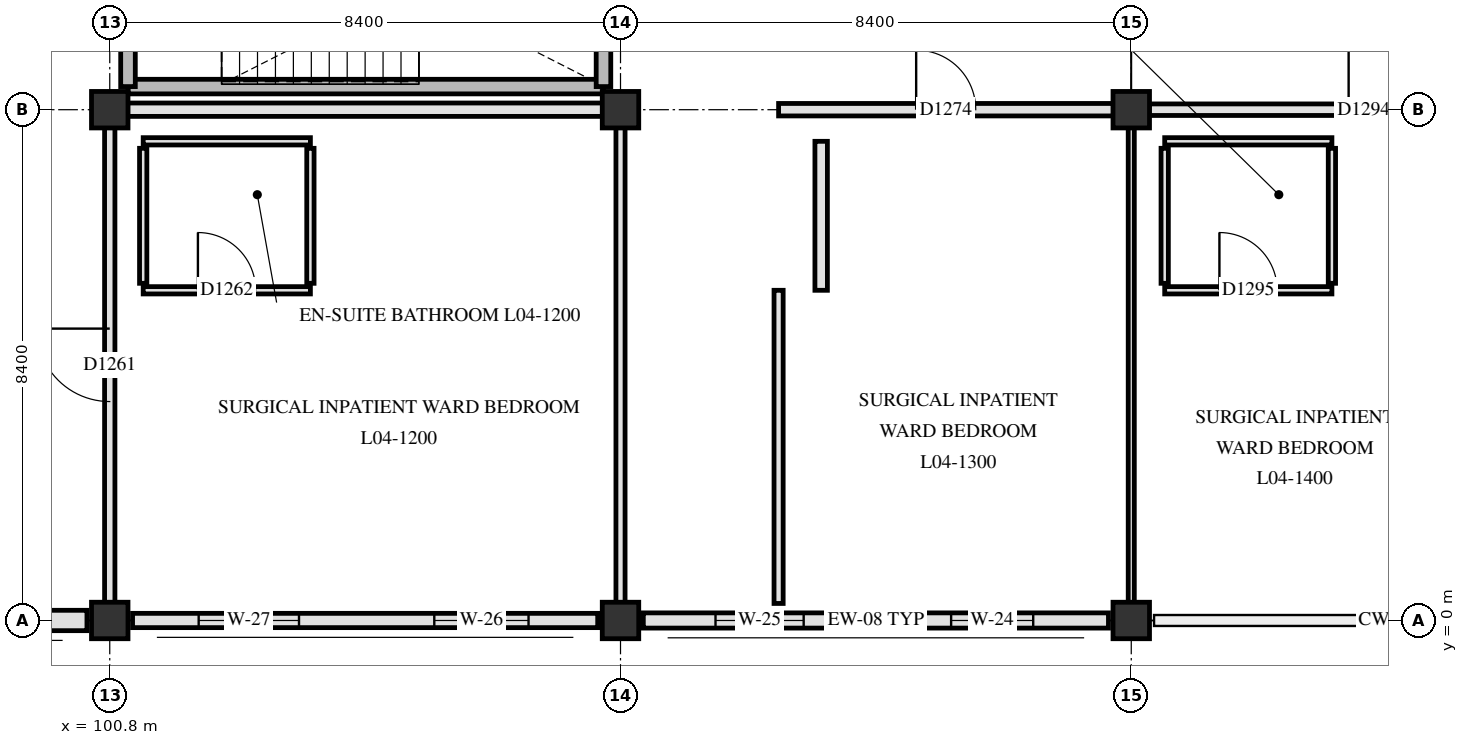
"""IFC4 building model, lengths in metres.
Left out: names, types, materials, properties, quantities, classifications, styles, units other than length and angle.
Written with IfcOpenShell. Run it as: python <this file> out.ifc"""

import sys

from ifc_helpers import new_model, si_unit, direction, frame, frame_2d, origin, origin_2d, place, context, subcontext, project, spatial, rectangle, extrude, element, fill, save


model = new_model("IFC4")
c1 = context("Model", 3, precision=1e-05, world=origin(), true_north=direction((0.0, 1.0)))
c2 = subcontext(c1, "Body", "Model", "MODEL_VIEW")
j1 = project(units=[si_unit("LENGTHUNIT", "METRE"), si_unit("PLANEANGLEUNIT", "RADIAN")], contexts=[c1])
p1 = place(None, origin())
s1 = spatial("IfcSite", under=j1, at=p1, CompositionType="ELEMENT")
p2 = place(p1, origin())
s2 = spatial("IfcBuilding", under=s1, at=p2, CompositionType="ELEMENT")
p3 = place(p2, frame((0.0, 0.0, 18.6)))
s3 = spatial("IfcBuildingStorey", under=s2, at=p3, CompositionType="ELEMENT", Elevation=18.6)
for number, where, z_axis, x_axis in (
    (1, (100.8, 0.0, 0.0), (0.0, 0.0, 1.0), (1.0, 0.0, 0.0)),
    (2, (100.8, 8.4, 0.0), (0.0, 0.0, 1.0), (1.0, 0.0, 0.0)),
    (3, (109.2, 0.0, 0.0), (0.0, 0.0, 1.0), (1.0, 0.0, 0.0)),
    (4, (109.2, 8.4, 0.0), (0.0, 0.0, 1.0), (1.0, 0.0, 0.0)),
    (5, (117.6, 0.0, 0.0), (0.0, 0.0, 1.0), (1.0, 0.0, 0.0)),
    (6, (117.6, 8.4, 0.0), (0.0, 0.0, 1.0), (1.0, 0.0, 0.0)),
):
    element("IfcColumn", number, at=place(p3, frame(where, z_axis=z_axis, x_axis=x_axis)), inside=s3, PredefinedType="COLUMN", context=c2, shape_type="SweptSolid", body=[
        extrude(rectangle(XDim=0.6, YDim=0.6, at=origin_2d()), origin(), (0.0, 0.0, 1.0), 3.9),
    ])
p4 = place(p3, frame((117.225, 0.0, 0.0), z_axis=(0.0, 0.0, 1.0), x_axis=(-1.0, 0.0, 0.0)))
e7 = element("IfcWall", 7, at=p4, inside=s3, PredefinedType="SOLIDWALL", context=c2, shape_type="SweptSolid", body=[
    extrude(rectangle(XDim=7.65, YDim=0.25, at=frame_2d((3.825, 0.0))), origin(), (0.0, 0.0, 1.0), 3.31),
])
p5 = place(p4, frame((1.238, 0.0, 0.85)))
e8 = element("IfcOpeningElement", 8, at=p5, cuts=e7, PredefinedType="OPENING", context=c2, shape_type="SweptSolid", body=[
    extrude(rectangle(XDim=1.35, YDim=1.54, at=frame_2d((0.675, 0.77))), frame((0.0, 0.135, 0.0), z_axis=(0.0, -1.0, 0.0), x_axis=(1.0, 0.0, 0.0)), (0.0, 0.0, 1.0), 0.27),
])
p6 = place(p4, frame((5.012, 0.0, 0.85)))
e9 = element("IfcOpeningElement", 9, at=p6, cuts=e7, PredefinedType="OPENING", context=c2, shape_type="SweptSolid", body=[
    extrude(rectangle(XDim=1.45, YDim=1.54, at=frame_2d((0.725, 0.77))), frame((0.0, 0.135, 0.0), z_axis=(0.0, -1.0, 0.0), x_axis=(1.0, 0.0, 0.0)), (0.0, 0.0, 1.0), 0.27),
])
p7 = place(p3, frame((108.825, 0.0, 0.0), z_axis=(0.0, 0.0, 1.0), x_axis=(-1.0, 0.0, 0.0)))
e10 = element("IfcWall", 10, at=p7, inside=s3, PredefinedType="SOLIDWALL", context=c2, shape_type="SweptSolid", body=[
    extrude(rectangle(XDim=7.65, YDim=0.235, at=frame_2d((3.825, 0.0))), origin(), (0.0, 0.0, 1.0), 3.31),
])
p8 = place(p7, frame((1.137, 0.0, 0.85)))
e11 = element("IfcOpeningElement", 11, at=p8, cuts=e10, PredefinedType="OPENING", context=c2, shape_type="SweptSolid", body=[
    extrude(rectangle(XDim=1.55, YDim=1.54, at=frame_2d((0.775, 0.77))), frame((0.0, 0.127, 0.0), z_axis=(0.0, -1.0, 0.0), x_axis=(1.0, 0.0, 0.0)), (0.0, 0.0, 1.0), 0.255),
])
p9 = place(p7, frame((4.913, 0.0, 0.85)))
e12 = element("IfcOpeningElement", 12, at=p9, cuts=e10, PredefinedType="OPENING", context=c2, shape_type="SweptSolid", body=[
    extrude(rectangle(XDim=1.65, YDim=1.54, at=frame_2d((0.825, 0.77))), frame((0.0, 0.127, 0.0), z_axis=(0.0, -1.0, 0.0), x_axis=(1.0, 0.0, 0.0)), (0.0, 0.0, 1.0), 0.255),
])
p10 = place(p3, frame((100.425, 0.0, 0.0), z_axis=(0.0, 0.0, 1.0), x_axis=(-1.0, 0.0, 0.0)))
e13 = element("IfcWall", 13, at=p10, inside=s3, PredefinedType="SOLIDWALL", context=c2, shape_type="SweptSolid", body=[
    extrude(rectangle(XDim=7.65, YDim=0.335, at=frame_2d((3.825, 0.0))), origin(), (0.0, 0.0, 1.0), 3.31),
])
p11 = place(p10, frame((1.038, 0.0, 0.85)))
e14 = element("IfcOpeningElement", 14, at=p11, cuts=e13, PredefinedType="OPENING", context=c2, shape_type="SweptSolid", body=[
    extrude(rectangle(XDim=1.75, YDim=1.54, at=frame_2d((0.875, 0.77))), frame((0.0, 0.177, 0.0), z_axis=(0.0, -1.0, 0.0), x_axis=(1.0, 0.0, 0.0)), (0.0, 0.0, 1.0), 0.355),
])
p12 = place(p10, frame((4.812, 0.0, 0.85)))
e15 = element("IfcOpeningElement", 15, at=p12, cuts=e13, PredefinedType="OPENING", context=c2, shape_type="SweptSolid", body=[
    extrude(rectangle(XDim=1.85, YDim=1.54, at=frame_2d((0.925, 0.77))), frame((0.0, 0.177, 0.0), z_axis=(0.0, -1.0, 0.0), x_axis=(1.0, 0.0, 0.0)), (0.0, 0.0, 1.0), 0.355),
])
p13 = place(p3, frame((101.1, 8.78, 0.0), z_axis=(0.0, 0.0, 1.0), x_axis=(1.0, 0.0, 0.0)))
e16 = element("IfcWall", 16, at=p13, inside=s3, PredefinedType="SHEAR", context=c2, shape_type="SweptSolid", body=[
    extrude(rectangle(XDim=7.82, YDim=0.24, at=frame_2d((3.91, 0.0))), origin(), (0.0, 0.0, 1.0), 3.62),
])
for number, where, z_axis, x_axis in (
    (17, (101.1, 8.78, 0.0), (0.0, 0.0, 1.0), (0.0, 1.0, 0.0)),
    (18, (108.92, 8.78, 0.0), (0.0, 0.0, 1.0), (0.0, 1.0, 0.0)),
):
    element("IfcWall", number, at=place(p3, frame(where, z_axis=z_axis, x_axis=x_axis)), inside=s3, PredefinedType="SHEAR", context=c2, shape_type="SweptSolid", body=[
        extrude(rectangle(XDim=3.32, YDim=0.24, at=frame_2d((1.66, 0.0))), origin(), (0.0, 0.0, 1.0), 3.62),
    ])
p14 = place(p3, frame((101.35, 5.43, 0.0), z_axis=(0.0, 0.0, 1.0), x_axis=(1.0, 0.0, 0.0)))
e19 = element("IfcWall", 19, at=p14, inside=s3, PredefinedType="PARTITIONING", context=c2, shape_type="SweptSolid", body=[
    extrude(rectangle(XDim=2.75, YDim=0.12, at=frame_2d((1.375, 0.0))), origin(), (0.0, 0.0, 1.0), 3.61),
])
p15 = place(p14, frame((0.9, 0.0, 0.0)))
e20 = element("IfcOpeningElement", 20, at=p15, cuts=e19, PredefinedType="OPENING", context=c2, shape_type="SweptSolid", body=[
    extrude(rectangle(XDim=0.95, YDim=2.1, at=frame_2d((0.475, 1.05))), frame((0.0, 0.07, 0.0), z_axis=(0.0, -1.0, 0.0), x_axis=(1.0, 0.0, 0.0)), (0.0, 0.0, 1.0), 0.14),
])
p16 = place(p3, frame((118.15, 5.43, 0.0), z_axis=(0.0, 0.0, 1.0), x_axis=(1.0, 0.0, 0.0)))
e21 = element("IfcWall", 21, at=p16, inside=s3, PredefinedType="PARTITIONING", context=c2, shape_type="SweptSolid", body=[
    extrude(rectangle(XDim=2.75, YDim=0.12, at=frame_2d((1.375, 0.0))), origin(), (0.0, 0.0, 1.0), 3.61),
])
p17 = place(p16, frame((0.9, 0.0, 0.0)))
e22 = element("IfcOpeningElement", 22, at=p17, cuts=e21, PredefinedType="OPENING", context=c2, shape_type="SweptSolid", body=[
    extrude(rectangle(XDim=0.95, YDim=2.1, at=frame_2d((0.475, 1.05))), frame((0.0, 0.07, 0.0), z_axis=(0.0, -1.0, 0.0), x_axis=(1.0, 0.0, 0.0)), (0.0, 0.0, 1.0), 0.14),
])
for number, where, z_axis, x_axis in (
    (23, (101.35, 7.88, 0.0), (0.0, 0.0, 1.0), (1.0, 0.0, 0.0)),
    (24, (118.15, 7.88, 0.0), (0.0, 0.0, 1.0), (1.0, 0.0, 0.0)),
):
    element("IfcWall", number, at=place(p3, frame(where, z_axis=z_axis, x_axis=x_axis)), inside=s3, PredefinedType="PARTITIONING", context=c2, shape_type="SweptSolid", body=[
        extrude(rectangle(XDim=2.75, YDim=0.12, at=frame_2d((1.375, 0.0))), origin(), (0.0, 0.0, 1.0), 3.61),
    ])
p18 = place(p3, frame((101.095, 8.4, 0.0), z_axis=(0.0, 0.0, 1.0), x_axis=(1.0, 0.0, 0.0)))
e25 = element("IfcWall", 25, at=p18, inside=s3, PredefinedType="PARTITIONING", context=c2, shape_type="SweptSolid", body=[
    extrude(rectangle(XDim=7.81, YDim=0.22, at=frame_2d((3.905, 0.0))), origin(), (0.0, 0.0, 1.0), 3.16),
])
p19 = place(p3, frame((111.8, 8.4, 0.0), z_axis=(0.0, 0.0, 1.0), x_axis=(1.0, 0.0, 0.0)))
e26 = element("IfcWall", 26, at=p19, inside=s3, PredefinedType="PARTITIONING", context=c2, shape_type="SweptSolid", body=[
    extrude(rectangle(XDim=5.505, YDim=0.205, at=frame_2d((2.752, 0.0))), origin(), (0.0, 0.0, 1.0), 3.16),
])
p20 = place(p19, frame((2.262, 0.0, 0.0)))
e27 = element("IfcOpeningElement", 27, at=p20, cuts=e26, PredefinedType="OPENING", context=c2, shape_type="SweptSolid", body=[
    extrude(rectangle(XDim=0.98, YDim=2.12, at=frame_2d((0.49, 1.06))), frame((0.0, 0.113, 0.0), z_axis=(0.0, -1.0, 0.0), x_axis=(1.0, 0.0, 0.0)), (0.0, 0.0, 1.0), 0.225),
])
p21 = place(p3, frame((117.895, 8.4, 0.0), z_axis=(0.0, 0.0, 1.0), x_axis=(1.0, 0.0, 0.0)))
e28 = element("IfcWall", 28, at=p21, inside=s3, PredefinedType="PARTITIONING", context=c2, shape_type="SweptSolid", body=[
    extrude(rectangle(XDim=7.81, YDim=0.19, at=frame_2d((3.905, 0.0))), origin(), (0.0, 0.0, 1.0), 3.16),
])
p22 = place(p21, frame((3.28, 0.0, 0.0)))
e29 = element("IfcOpeningElement", 29, at=p22, cuts=e28, PredefinedType="OPENING", context=c2, shape_type="SweptSolid", body=[
    extrude(rectangle(XDim=1.25, YDim=2.2, at=frame_2d((0.625, 1.1))), frame((0.0, 0.105, 0.0), z_axis=(0.0, -1.0, 0.0), x_axis=(1.0, 0.0, 0.0)), (0.0, 0.0, 1.0), 0.21),
])
p23 = place(p3, frame((100.8, 0.295, 0.0), z_axis=(0.0, 0.0, 1.0), x_axis=(0.0, 1.0, 0.0)))
e30 = element("IfcWall", 30, at=p23, inside=s3, PredefinedType="PARTITIONING", context=c2, shape_type="SweptSolid", body=[
    extrude(rectangle(XDim=7.81, YDim=0.17, at=frame_2d((3.905, 0.0))), origin(), (0.0, 0.0, 1.0), 3.26),
])
p24 = place(p23, frame((3.305, 0.0, 0.0)))
e31 = element("IfcOpeningElement", 31, at=p24, cuts=e30, PredefinedType="OPENING", context=c2, shape_type="SweptSolid", body=[
    extrude(rectangle(XDim=1.2, YDim=2.15, at=frame_2d((0.6, 1.075))), frame((0.0, 0.095, 0.0), z_axis=(0.0, -1.0, 0.0), x_axis=(1.0, 0.0, 0.0)), (0.0, 0.0, 1.0), 0.19),
])
for number, where, z_axis, x_axis in (
    (32, (101.35, 5.545, 0.0), (0.0, 0.0, 1.0), (0.0, 1.0, 0.0)),
    (33, (104.1, 5.545, 0.0), (0.0, 0.0, 1.0), (0.0, 1.0, 0.0)),
):
    element("IfcWall", number, at=place(p3, frame(where, z_axis=z_axis, x_axis=x_axis)), inside=s3, PredefinedType="PARTITIONING", context=c2, shape_type="SweptSolid", body=[
        extrude(rectangle(XDim=2.22, YDim=0.12, at=frame_2d((1.11, 0.0))), origin(), (0.0, 0.0, 1.0), 3.31),
    ])
p25 = place(p3, frame((109.2, 0.295, 0.0), z_axis=(0.0, 0.0, 1.0), x_axis=(0.0, 1.0, 0.0)))
e34 = element("IfcWall", 34, at=p25, inside=s3, PredefinedType="PARTITIONING", context=c2, shape_type="SweptSolid", body=[
    extrude(rectangle(XDim=7.81, YDim=0.15, at=frame_2d((3.905, 0.0))), origin(), (0.0, 0.0, 1.0), 3.26),
])
p26 = place(p3, frame((111.8, 0.28, 0.0), z_axis=(0.0, 0.0, 1.0), x_axis=(0.0, 1.0, 0.0)))
e35 = element("IfcWall", 35, at=p26, inside=s3, PredefinedType="PARTITIONING", context=c2, shape_type="SweptSolid", body=[
    extrude(rectangle(XDim=5.15, YDim=0.15, at=frame_2d((2.575, 0.0))), origin(), (0.0, 0.0, 1.0), 3.31),
])
p27 = place(p3, frame((112.5, 5.43, 0.0), z_axis=(0.0, 0.0, 1.0), x_axis=(0.0, 1.0, 0.0)))
e36 = element("IfcWall", 36, at=p27, inside=s3, PredefinedType="PARTITIONING", context=c2, shape_type="SweptSolid", body=[
    extrude(rectangle(XDim=2.45, YDim=0.205, at=frame_2d((1.225, 0.0))), origin(), (0.0, 0.0, 1.0), 3.31),
])
p28 = place(p3, frame((117.6, 0.295, 0.0), z_axis=(0.0, 0.0, 1.0), x_axis=(0.0, 1.0, 0.0)))
e37 = element("IfcWall", 37, at=p28, inside=s3, PredefinedType="PARTITIONING", context=c2, shape_type="SweptSolid", body=[
    extrude(rectangle(XDim=7.81, YDim=0.1, at=frame_2d((3.905, 0.0))), origin(), (0.0, 0.0, 1.0), 3.26),
])
for number, where, z_axis, x_axis in (
    (38, (118.15, 5.545, 0.0), (0.0, 0.0, 1.0), (0.0, 1.0, 0.0)),
    (39, (120.9, 5.545, 0.0), (0.0, 0.0, 1.0), (0.0, 1.0, 0.0)),
):
    element("IfcWall", number, at=place(p3, frame(where, z_axis=z_axis, x_axis=x_axis)), inside=s3, PredefinedType="PARTITIONING", context=c2, shape_type="SweptSolid", body=[
        extrude(rectangle(XDim=2.22, YDim=0.12, at=frame_2d((1.11, 0.0))), origin(), (0.0, 0.0, 1.0), 3.31),
    ])
p29 = place(p5, origin())
e40 = element("IfcWindow", 40, at=p29, inside=s3, PartitioningType="SINGLE_PANEL", PredefinedType="WINDOW", context=c2, shape_type="SweptSolid", body=[
    extrude(rectangle(XDim=1.35, YDim=1.54, at=frame_2d((0.675, 0.77))), frame((0.0, 0.03, 0.0), z_axis=(0.0, -1.0, 0.0), x_axis=(1.0, 0.0, 0.0)), (0.0, 0.0, 1.0), 0.06),
])
fill(e8, e40)
p30 = place(p6, origin())
e41 = element("IfcWindow", 41, at=p30, inside=s3, PartitioningType="SINGLE_PANEL", PredefinedType="WINDOW", context=c2, shape_type="SweptSolid", body=[
    extrude(rectangle(XDim=1.45, YDim=1.54, at=frame_2d((0.725, 0.77))), frame((0.0, 0.03, 0.0), z_axis=(0.0, -1.0, 0.0), x_axis=(1.0, 0.0, 0.0)), (0.0, 0.0, 1.0), 0.06),
])
fill(e9, e41)
p31 = place(p8, origin())
e42 = element("IfcWindow", 42, at=p31, inside=s3, PartitioningType="SINGLE_PANEL", PredefinedType="WINDOW", context=c2, shape_type="SweptSolid", body=[
    extrude(rectangle(XDim=1.55, YDim=1.54, at=frame_2d((0.775, 0.77))), frame((0.0, 0.03, 0.0), z_axis=(0.0, -1.0, 0.0), x_axis=(1.0, 0.0, 0.0)), (0.0, 0.0, 1.0), 0.06),
])
fill(e11, e42)
p32 = place(p9, origin())
e43 = element("IfcWindow", 43, at=p32, inside=s3, PartitioningType="SINGLE_PANEL", PredefinedType="WINDOW", context=c2, shape_type="SweptSolid", body=[
    extrude(rectangle(XDim=1.65, YDim=1.54, at=frame_2d((0.825, 0.77))), frame((0.0, 0.03, 0.0), z_axis=(0.0, -1.0, 0.0), x_axis=(1.0, 0.0, 0.0)), (0.0, 0.0, 1.0), 0.06),
])
fill(e12, e43)
p33 = place(p24, origin())
e44 = element("IfcDoor", 44, at=p33, inside=s3, OperationType="SINGLE_SWING_RIGHT", PredefinedType="DOOR", context=c2, shape_type="SweptSolid", body=[
    extrude(rectangle(XDim=1.2, YDim=2.15, at=frame_2d((0.6, 1.075))), frame((0.0, 0.025, 0.0), z_axis=(0.0, -1.0, 0.0), x_axis=(1.0, 0.0, 0.0)), (0.0, 0.0, 1.0), 0.05),
])
fill(e31, e44)
p34 = place(p15, origin())
e45 = element("IfcDoor", 45, at=p34, inside=s3, OperationType="SINGLE_SWING_LEFT", PredefinedType="DOOR", context=c2, shape_type="SweptSolid", body=[
    extrude(rectangle(XDim=0.95, YDim=2.1, at=frame_2d((0.475, 1.05))), frame((0.0, 0.025, 0.0), z_axis=(0.0, -1.0, 0.0), x_axis=(1.0, 0.0, 0.0)), (0.0, 0.0, 1.0), 0.05),
])
fill(e20, e45)
p35 = place(p20, origin())
e46 = element("IfcDoor", 46, at=p35, inside=s3, OperationType="SINGLE_SWING_LEFT", PredefinedType="DOOR", context=c2, shape_type="SweptSolid", body=[
    extrude(rectangle(XDim=0.98, YDim=2.12, at=frame_2d((0.49, 1.06))), frame((0.0, 0.025, 0.0), z_axis=(0.0, -1.0, 0.0), x_axis=(1.0, 0.0, 0.0)), (0.0, 0.0, 1.0), 0.05),
])
fill(e27, e46)
p36 = place(p22, origin())
e47 = element("IfcDoor", 47, at=p36, inside=s3, OperationType="SINGLE_SWING_LEFT", PredefinedType="DOOR", context=c2, shape_type="SweptSolid", body=[
    extrude(rectangle(XDim=1.25, YDim=2.2, at=frame_2d((0.625, 1.1))), frame((0.0, 0.025, 0.0), z_axis=(0.0, -1.0, 0.0), x_axis=(1.0, 0.0, 0.0)), (0.0, 0.0, 1.0), 0.05),
])
fill(e29, e47)
p37 = place(p17, origin())
e48 = element("IfcDoor", 48, at=p37, inside=s3, OperationType="SINGLE_SWING_LEFT", PredefinedType="DOOR", context=c2, shape_type="SweptSolid", body=[
    extrude(rectangle(XDim=0.95, YDim=2.1, at=frame_2d((0.475, 1.05))), frame((0.0, 0.025, 0.0), z_axis=(0.0, -1.0, 0.0), x_axis=(1.0, 0.0, 0.0)), (0.0, 0.0, 1.0), 0.05),
])
fill(e22, e48)
save(model, sys.argv[1])
